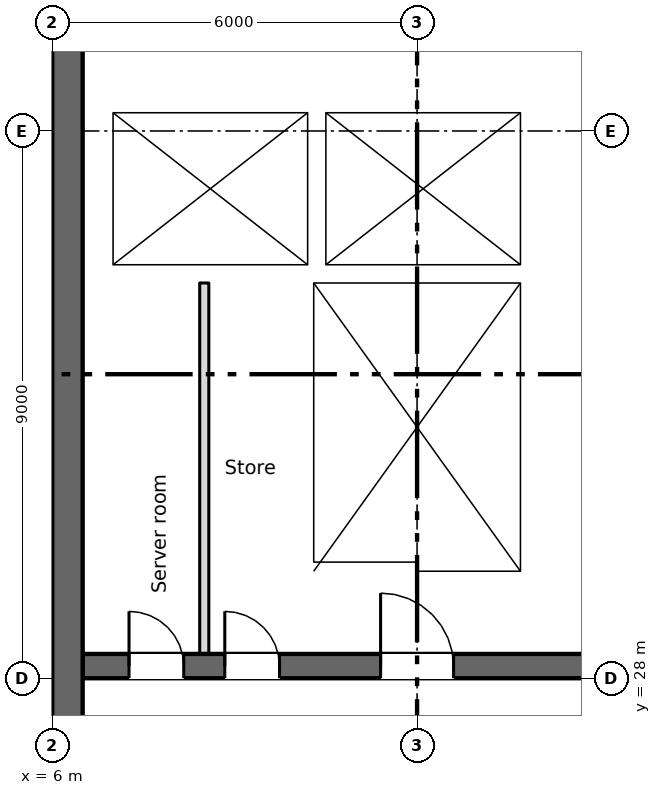
"""IFC4 building model, lengths in metres.
Left out: names, types, materials, properties, quantities, classifications, styles, units other than length and angle.
Written with IfcOpenShell. Run it as: python <this file> out.ifc"""

import sys

from ifc_helpers import new_model, si_unit, direction, frame, frame_2d, origin, place, context, subcontext, project, spatial, rectangle, extrude, element, fill, save


model = new_model("IFC4")
c1 = context("Model", 3, precision=1e-05, world=origin(), true_north=direction((0.0, 1.0)))
c2 = subcontext(c1, "Body", "Model", "MODEL_VIEW")
j1 = project(units=[si_unit("LENGTHUNIT", "METRE"), si_unit("PLANEANGLEUNIT", "RADIAN")], contexts=[c1])
p1 = place(None, origin())
s1 = spatial("IfcSite", under=j1, at=p1, CompositionType="ELEMENT")
p2 = place(p1, origin())
s2 = spatial("IfcBuilding", under=s1, at=p2, CompositionType="ELEMENT")
p3 = place(p2, frame((0.0, 0.0, 231.75)))
s3 = spatial("IfcBuildingStorey", under=s2, at=p3, CompositionType="ELEMENT", Elevation=231.75)
p4 = place(p3, frame((6.25, 8.5, 0.0), z_axis=(0.0, 0.0, 1.0), x_axis=(0.0, 1.0, 0.0)))
e1 = element("IfcWall", 1, at=p4, inside=s3, PredefinedType="SHEAR", context=c2, shape_type="SweptSolid", body=[
    extrude(rectangle(XDim=33.0, YDim=0.5, at=frame_2d((16.5, 0.0))), origin(), (0.0, 0.0, 1.0), 3.4),
])
p5 = place(p4, frame((1.2, 0.0, 0.6)))
e2 = element("IfcOpeningElement", 2, at=p5, cuts=e1, PredefinedType="OPENING", context=c2, shape_type="SweptSolid", body=[
    extrude(rectangle(XDim=0.6, YDim=2.4, at=frame_2d((0.3, 1.2))), frame((0.0, 0.26, 0.0), z_axis=(0.0, -1.0, 0.0), x_axis=(1.0, 0.0, 0.0)), (0.0, 0.0, 1.0), 0.52),
])
p6 = place(p4, frame((7.2, 0.0, 0.6)))
e3 = element("IfcOpeningElement", 3, at=p6, cuts=e1, PredefinedType="OPENING", context=c2, shape_type="SweptSolid", body=[
    extrude(rectangle(XDim=0.6, YDim=2.4, at=frame_2d((0.3, 1.2))), frame((0.0, 0.26, 0.0), z_axis=(0.0, -1.0, 0.0), x_axis=(1.0, 0.0, 0.0)), (0.0, 0.0, 1.0), 0.52),
])
p7 = place(p4, frame((13.2, 0.0, 0.6)))
e4 = element("IfcOpeningElement", 4, at=p7, cuts=e1, PredefinedType="OPENING", context=c2, shape_type="SweptSolid", body=[
    extrude(rectangle(XDim=0.6, YDim=2.4, at=frame_2d((0.3, 1.2))), frame((0.0, 0.26, 0.0), z_axis=(0.0, -1.0, 0.0), x_axis=(1.0, 0.0, 0.0)), (0.0, 0.0, 1.0), 0.52),
])
p8 = place(p3, frame((6.5, 28.2, 0.0), z_axis=(0.0, 0.0, 1.0), x_axis=(1.0, 0.0, 0.0)))
e5 = element("IfcWall", 5, at=p8, inside=s3, PredefinedType="SHEAR", context=c2, shape_type="SweptSolid", body=[
    extrude(rectangle(XDim=58.0, YDim=0.4, at=frame_2d((29.0, 0.0))), origin(), (0.0, 0.0, 1.0), 3.4),
])
p9 = place(p8, frame((13.012, 0.0, 0.0)))
e6 = element("IfcOpeningElement", 6, at=p9, cuts=e5, PredefinedType="OPENING", context=c2, shape_type="SweptSolid", body=[
    extrude(rectangle(XDim=0.9, YDim=2.1, at=frame_2d((0.45, 1.05))), frame((0.0, 0.21, 0.0), z_axis=(0.0, -1.0, 0.0), x_axis=(1.0, 0.0, 0.0)), (0.0, 0.0, 1.0), 0.42),
])
p10 = place(p8, frame((15.587, 0.0, 0.0)))
e7 = element("IfcOpeningElement", 7, at=p10, cuts=e5, PredefinedType="OPENING", context=c2, shape_type="SweptSolid", body=[
    extrude(rectangle(XDim=0.9, YDim=2.1, at=frame_2d((0.45, 1.05))), frame((0.0, 0.21, 0.0), z_axis=(0.0, -1.0, 0.0), x_axis=(1.0, 0.0, 0.0)), (0.0, 0.0, 1.0), 0.42),
])
p11 = place(p8, frame((48.512, 0.0, 0.0)))
e8 = element("IfcOpeningElement", 8, at=p11, cuts=e5, PredefinedType="OPENING", context=c2, shape_type="SweptSolid", body=[
    extrude(rectangle(XDim=0.9, YDim=2.1, at=frame_2d((0.45, 1.05))), frame((0.0, 0.21, 0.0), z_axis=(0.0, -1.0, 0.0), x_axis=(1.0, 0.0, 0.0)), (0.0, 0.0, 1.0), 0.42),
])
p12 = place(p8, frame((51.087, 0.0, 0.0)))
e9 = element("IfcOpeningElement", 9, at=p12, cuts=e5, PredefinedType="OPENING", context=c2, shape_type="SweptSolid", body=[
    extrude(rectangle(XDim=0.9, YDim=2.1, at=frame_2d((0.45, 1.05))), frame((0.0, 0.21, 0.0), z_axis=(0.0, -1.0, 0.0), x_axis=(1.0, 0.0, 0.0)), (0.0, 0.0, 1.0), 0.42),
])
p13 = place(p8, frame((0.762, 0.0, 0.0)))
e10 = element("IfcOpeningElement", 10, at=p13, cuts=e5, PredefinedType="OPENING", context=c2, shape_type="SweptSolid", body=[
    extrude(rectangle(XDim=0.9, YDim=2.1, at=frame_2d((0.45, 1.05))), frame((0.0, 0.21, 0.0), z_axis=(0.0, -1.0, 0.0), x_axis=(1.0, 0.0, 0.0)), (0.0, 0.0, 1.0), 0.42),
])
p14 = place(p8, frame((2.337, 0.0, 0.0)))
e11 = element("IfcOpeningElement", 11, at=p14, cuts=e5, PredefinedType="OPENING", context=c2, shape_type="SweptSolid", body=[
    extrude(rectangle(XDim=0.9, YDim=2.1, at=frame_2d((0.45, 1.05))), frame((0.0, 0.21, 0.0), z_axis=(0.0, -1.0, 0.0), x_axis=(1.0, 0.0, 0.0)), (0.0, 0.0, 1.0), 0.42),
])
p15 = place(p8, frame((4.9, 0.0, 0.0)))
e12 = element("IfcOpeningElement", 12, at=p15, cuts=e5, PredefinedType="OPENING", context=c2, shape_type="SweptSolid", body=[
    extrude(rectangle(XDim=1.2, YDim=2.1, at=frame_2d((0.6, 1.05))), frame((0.0, 0.21, 0.0), z_axis=(0.0, -1.0, 0.0), x_axis=(1.0, 0.0, 0.0)), (0.0, 0.0, 1.0), 0.42),
])
p16 = place(p8, frame((31.9, 0.0, 0.0)))
e13 = element("IfcOpeningElement", 13, at=p16, cuts=e5, PredefinedType="OPENING", context=c2, shape_type="SweptSolid", body=[
    extrude(rectangle(XDim=1.2, YDim=2.1, at=frame_2d((0.6, 1.05))), frame((0.0, 0.21, 0.0), z_axis=(0.0, -1.0, 0.0), x_axis=(1.0, 0.0, 0.0)), (0.0, 0.0, 1.0), 0.42),
])
p17 = place(p8, frame((55.4, 0.0, 0.0)))
e14 = element("IfcOpeningElement", 14, at=p17, cuts=e5, PredefinedType="OPENING", context=c2, shape_type="SweptSolid", body=[
    extrude(rectangle(XDim=1.2, YDim=2.1, at=frame_2d((0.6, 1.05))), frame((0.0, 0.21, 0.0), z_axis=(0.0, -1.0, 0.0), x_axis=(1.0, 0.0, 0.0)), (0.0, 0.0, 1.0), 0.42),
])
p18 = place(p8, frame((21.9, 0.0, 0.0)))
e15 = element("IfcOpeningElement", 15, at=p18, cuts=e5, PredefinedType="OPENING", context=c2, shape_type="SweptSolid", body=[
    extrude(rectangle(XDim=1.2, YDim=2.1, at=frame_2d((0.6, 1.05))), frame((0.0, 0.21, 0.0), z_axis=(0.0, -1.0, 0.0), x_axis=(1.0, 0.0, 0.0)), (0.0, 0.0, 1.0), 0.42),
])
p19 = place(p8, frame((41.9, 0.0, 0.0)))
e16 = element("IfcOpeningElement", 16, at=p19, cuts=e5, PredefinedType="OPENING", context=c2, shape_type="SweptSolid", body=[
    extrude(rectangle(XDim=1.2, YDim=2.1, at=frame_2d((0.6, 1.05))), frame((0.0, 0.21, 0.0), z_axis=(0.0, -1.0, 0.0), x_axis=(1.0, 0.0, 0.0)), (0.0, 0.0, 1.0), 0.42),
])
p20 = place(p8, frame((25.05, 0.0, 0.0)))
e17 = element("IfcOpeningElement", 17, at=p20, cuts=e5, PredefinedType="OPENING", context=c2, shape_type="SweptSolid", body=[
    extrude(rectangle(XDim=2.4, YDim=2.1, at=frame_2d((1.2, 1.05))), frame((0.0, 0.21, 0.0), z_axis=(0.0, -1.0, 0.0), x_axis=(1.0, 0.0, 0.0)), (0.0, 0.0, 1.0), 0.42),
])
p21 = place(p8, frame((37.55, 0.0, 0.0)))
e18 = element("IfcOpeningElement", 18, at=p21, cuts=e5, PredefinedType="OPENING", context=c2, shape_type="SweptSolid", body=[
    extrude(rectangle(XDim=2.4, YDim=2.1, at=frame_2d((1.2, 1.05))), frame((0.0, 0.21, 0.0), z_axis=(0.0, -1.0, 0.0), x_axis=(1.0, 0.0, 0.0)), (0.0, 0.0, 1.0), 0.42),
])
p22 = place(p8, frame((8.25, 0.0, 0.0)))
e19 = element("IfcOpeningElement", 19, at=p22, cuts=e5, PredefinedType="OPENING", context=c2, shape_type="SweptSolid", body=[
    extrude(rectangle(XDim=2.4, YDim=2.1, at=frame_2d((1.2, 1.05))), frame((0.0, 0.21, 0.0), z_axis=(0.0, -1.0, 0.0), x_axis=(1.0, 0.0, 0.0)), (0.0, 0.0, 1.0), 0.42),
])
p23 = place(p8, frame((29.05, 0.0, 0.0)))
e20 = element("IfcOpeningElement", 20, at=p23, cuts=e5, PredefinedType="OPENING", context=c2, shape_type="SweptSolid", body=[
    extrude(rectangle(XDim=0.9, YDim=2.1, at=frame_2d((0.45, 1.05))), frame((0.0, 0.21, 0.0), z_axis=(0.0, -1.0, 0.0), x_axis=(1.0, 0.0, 0.0)), (0.0, 0.0, 1.0), 0.42),
])
p24 = place(p8, frame((35.05, 0.0, 0.0)))
e21 = element("IfcOpeningElement", 21, at=p24, cuts=e5, PredefinedType="OPENING", context=c2, shape_type="SweptSolid", body=[
    extrude(rectangle(XDim=0.9, YDim=2.1, at=frame_2d((0.45, 1.05))), frame((0.0, 0.21, 0.0), z_axis=(0.0, -1.0, 0.0), x_axis=(1.0, 0.0, 0.0)), (0.0, 0.0, 1.0), 0.42),
])
p25 = place(p3, frame((6.75, 28.4, 0.0), z_axis=(0.0, 0.0, 1.0), x_axis=(0.0, 1.0, 0.0)))
e22 = element("IfcWall", 22, at=p25, inside=s3, PredefinedType="SHEAR", context=c2, shape_type="SweptSolid", body=[
    extrude(rectangle(XDim=12.85, YDim=0.5, at=frame_2d((6.425, 0.0))), origin(), (0.0, 0.0, 1.0), 3.4),
])
for number, where, z_axis, x_axis in (
    (23, (10.15, 28.4, 0.0), (0.0, 0.0, 1.0), (0.0, 1.0, 0.0)),
    (24, (13.85, 28.4, 0.0), (0.0, 0.0, 1.0), (0.0, 1.0, 0.0)),
):
    element("IfcWall", number, at=place(p3, frame(where, z_axis=z_axis, x_axis=x_axis)), inside=s3, PredefinedType="SHEAR", context=c2, shape_type="SweptSolid", body=[
        extrude(rectangle(XDim=6.1, YDim=0.3, at=frame_2d((3.05, 0.0))), origin(), (0.0, 0.0, 1.0), 3.4),
    ])
p26 = place(p3, frame((7.0, 34.65, 0.0), z_axis=(0.0, 0.0, 1.0), x_axis=(1.0, 0.0, 0.0)))
e25 = element("IfcWall", 25, at=p26, inside=s3, PredefinedType="SHEAR", context=c2, shape_type="SweptSolid", body=[
    extrude(rectangle(XDim=7.0, YDim=0.3, at=frame_2d((3.5, 0.0))), origin(), (0.0, 0.0, 1.0), 3.4),
])
p27 = place(p3, frame((7.0, 37.45, 0.0), z_axis=(0.0, 0.0, 1.0), x_axis=(1.0, 0.0, 0.0)))
e26 = element("IfcWall", 26, at=p27, inside=s3, PredefinedType="SHEAR", context=c2, shape_type="SweptSolid", body=[
    extrude(rectangle(XDim=7.0, YDim=0.3, at=frame_2d((3.5, 0.0))), origin(), (0.0, 0.0, 1.0), 3.4),
])
p28 = place(p27, frame((1.05, 0.0, 0.0)))
e27 = element("IfcOpeningElement", 27, at=p28, cuts=e26, PredefinedType="OPENING", context=c2, shape_type="SweptSolid", body=[
    extrude(rectangle(XDim=1.1, YDim=2.1, at=frame_2d((0.55, 1.05))), frame((0.0, 0.16, 0.0), z_axis=(0.0, -1.0, 0.0), x_axis=(1.0, 0.0, 0.0)), (0.0, 0.0, 1.0), 0.32),
])
p29 = place(p27, frame((4.55, 0.0, 0.0)))
e28 = element("IfcOpeningElement", 28, at=p29, cuts=e26, PredefinedType="OPENING", context=c2, shape_type="SweptSolid", body=[
    extrude(rectangle(XDim=1.1, YDim=2.1, at=frame_2d((0.55, 1.05))), frame((0.0, 0.16, 0.0), z_axis=(0.0, -1.0, 0.0), x_axis=(1.0, 0.0, 0.0)), (0.0, 0.0, 1.0), 0.32),
])
for number, where, z_axis, x_axis in (
    (29, (13.85, 34.8, 0.0), (0.0, 0.0, 1.0), (0.0, 1.0, 0.0)),
    (30, (10.35, 34.8, 0.0), (0.0, 0.0, 1.0), (0.0, 1.0, 0.0)),
):
    element("IfcWall", number, at=place(p3, frame(where, z_axis=z_axis, x_axis=x_axis)), inside=s3, PredefinedType="SHEAR", context=c2, shape_type="SweptSolid", body=[
        extrude(rectangle(XDim=2.5, YDim=0.3, at=frame_2d((1.25, 0.0))), origin(), (0.0, 0.0, 1.0), 3.4),
    ])
p30 = place(p3, frame((8.5, 28.4, 0.0), z_axis=(0.0, 0.0, 1.0), x_axis=(0.0, 1.0, 0.0)))
e31 = element("IfcWall", 31, at=p30, inside=s3, PredefinedType="PARTITIONING", context=c2, shape_type="SweptSolid", body=[
    extrude(rectangle(XDim=6.1, YDim=0.15, at=frame_2d((3.05, 0.0))), origin(), (0.0, 0.0, 1.0), 3.4),
])
p31 = place(p13, origin())
e32 = element("IfcDoor", 32, at=p31, inside=s3, OperationType="SINGLE_SWING_LEFT", PredefinedType="DOOR", context=c2, shape_type="SweptSolid", body=[
    extrude(rectangle(XDim=0.9, YDim=2.1, at=frame_2d((0.45, 1.05))), frame((0.0, 0.025, 0.0), z_axis=(0.0, -1.0, 0.0), x_axis=(1.0, 0.0, 0.0)), (0.0, 0.0, 1.0), 0.05),
])
fill(e10, e32)
p32 = place(p14, origin())
e33 = element("IfcDoor", 33, at=p32, inside=s3, OperationType="SINGLE_SWING_LEFT", PredefinedType="DOOR", context=c2, shape_type="SweptSolid", body=[
    extrude(rectangle(XDim=0.9, YDim=2.1, at=frame_2d((0.45, 1.05))), frame((0.0, 0.025, 0.0), z_axis=(0.0, -1.0, 0.0), x_axis=(1.0, 0.0, 0.0)), (0.0, 0.0, 1.0), 0.05),
])
fill(e11, e33)
p33 = place(p28, origin())
e34 = element("IfcDoor", 34, at=p33, inside=s3, OperationType="SLIDING_TO_LEFT", PredefinedType="DOOR", context=c2, shape_type="SweptSolid", body=[
    extrude(rectangle(XDim=1.1, YDim=2.1, at=frame_2d((0.55, 1.05))), frame((0.0, 0.025, 0.0), z_axis=(0.0, -1.0, 0.0), x_axis=(1.0, 0.0, 0.0)), (0.0, 0.0, 1.0), 0.05),
])
fill(e27, e34)
p34 = place(p29, origin())
e35 = element("IfcDoor", 35, at=p34, inside=s3, OperationType="SLIDING_TO_LEFT", PredefinedType="DOOR", context=c2, shape_type="SweptSolid", body=[
    extrude(rectangle(XDim=1.1, YDim=2.1, at=frame_2d((0.55, 1.05))), frame((0.0, 0.025, 0.0), z_axis=(0.0, -1.0, 0.0), x_axis=(1.0, 0.0, 0.0)), (0.0, 0.0, 1.0), 0.05),
])
fill(e28, e35)
p35 = place(p15, origin())
e36 = element("IfcDoor", 36, at=p35, inside=s3, OperationType="SINGLE_SWING_LEFT", PredefinedType="DOOR", context=c2, shape_type="SweptSolid", body=[
    extrude(rectangle(XDim=1.2, YDim=2.1, at=frame_2d((0.6, 1.05))), frame((0.0, 0.025, 0.0), z_axis=(0.0, -1.0, 0.0), x_axis=(1.0, 0.0, 0.0)), (0.0, 0.0, 1.0), 0.05),
])
fill(e12, e36)
save(model, sys.argv[1])
